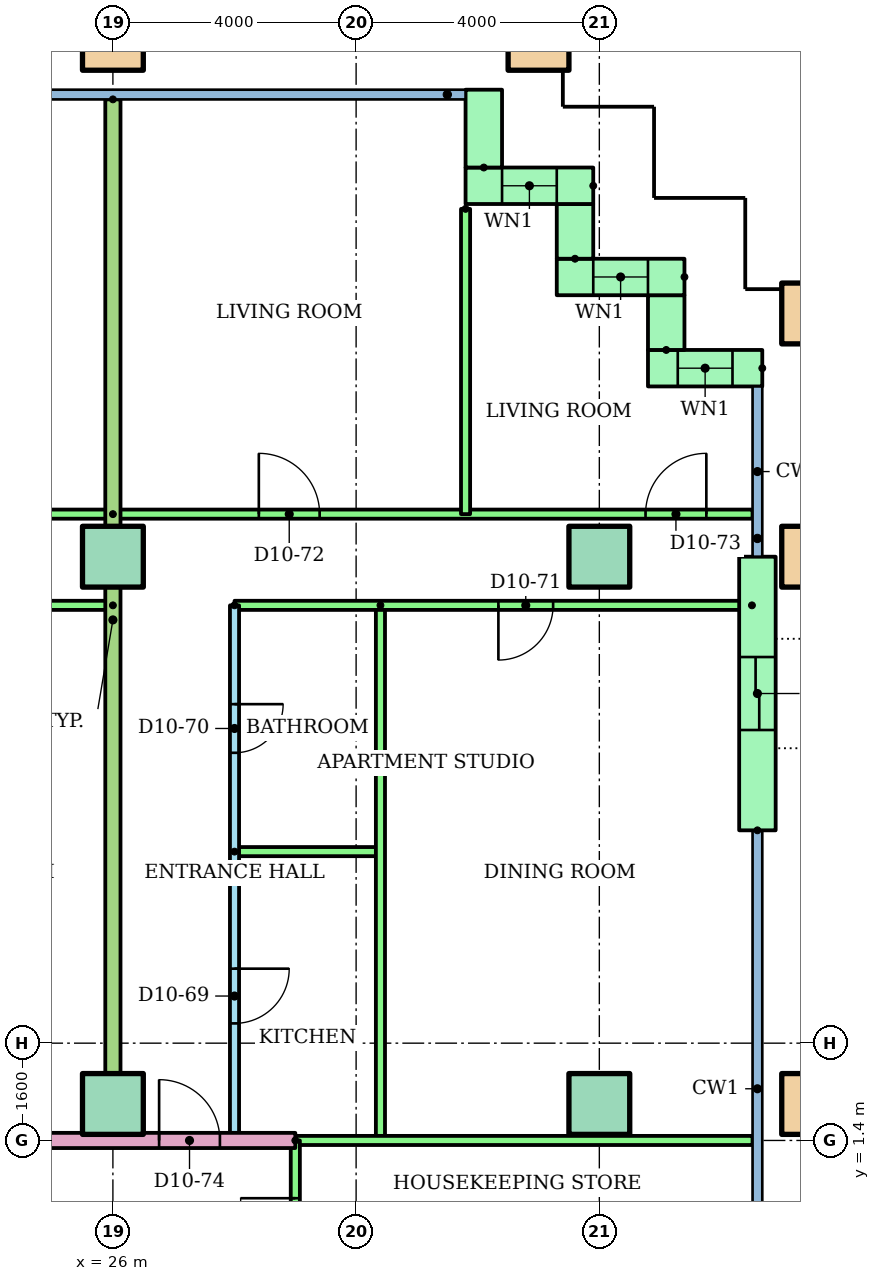
"""IFC4 building model, lengths in metres.
Left out: names, types, materials, properties, quantities, classifications, styles, units other than length and angle.
Written with IfcOpenShell. Run it as: python <this file> out.ifc"""

import sys

from ifc_helpers import new_model, si_unit, direction, frame, frame_2d, origin, origin_2d, place, context, subcontext, project, spatial, rectangle, hollow_rectangle, extrude, element, fill, save


model = new_model("IFC4")
c1 = context("Model", 3, precision=1e-05, world=origin(), true_north=direction((0.0, 1.0)))
c2 = subcontext(c1, "Body", "Model", "MODEL_VIEW")
j1 = project(units=[si_unit("LENGTHUNIT", "METRE"), si_unit("PLANEANGLEUNIT", "RADIAN")], contexts=[c1])
p1 = place(None, origin())
s1 = spatial("IfcSite", under=j1, at=p1, CompositionType="ELEMENT")
p2 = place(p1, origin())
s2 = spatial("IfcBuilding", under=s1, at=p2, CompositionType="ELEMENT")
p3 = place(p2, frame((0.0, 0.0, 41.6)))
s3 = spatial("IfcBuildingStorey", under=s2, at=p3, CompositionType="ELEMENT", Elevation=41.6)
for number, where in (
    (1, (26.0, 2.0, 0.0)),
    (2, (34.0, 2.0, 0.0)),
):
    element("IfcColumn", number, at=place(p3, frame(where)), inside=s3, PredefinedType="COLUMN", context=c2, shape_type="SweptSolid", body=[
        extrude(rectangle(XDim=1.0, YDim=1.0, at=origin_2d()), origin(), (0.0, 0.0, 1.0), 3.2),
    ])
p4 = place(p3, frame((37.5, 2.0, 0.0)))
e3 = element("IfcColumn", 3, at=p4, inside=s3, PredefinedType="COLUMN", context=c2, shape_type="SweptSolid", body=[
    extrude(hollow_rectangle(XDim=1.0, YDim=1.0, WallThickness=0.05, at=origin_2d()), origin(), (0.0, 0.0, 1.0), 3.2),
])
for number, where in (
    (4, (26.0, 11.0, 0.0)),
    (5, (34.0, 11.0, 0.0)),
):
    element("IfcColumn", number, at=place(p3, frame(where)), inside=s3, PredefinedType="COLUMN", context=c2, shape_type="SweptSolid", body=[
        extrude(rectangle(XDim=1.0, YDim=1.0, at=origin_2d()), origin(), (0.0, 0.0, 1.0), 3.2),
    ])
for number, where in (
    (6, (37.5, 11.0, 0.0)),
    (7, (37.5, 15.0, 0.0)),
    (8, (26.0, 19.5, 0.0)),
    (9, (33.0, 19.5, 0.0)),
):
    element("IfcColumn", number, at=place(p3, frame(where)), inside=s3, PredefinedType="COLUMN", context=c2, shape_type="SweptSolid", body=[
        extrude(hollow_rectangle(XDim=1.0, YDim=1.0, WallThickness=0.05, at=origin_2d()), origin(), (0.0, 0.0, 1.0), 3.2),
    ])
p5 = place(p3, frame((36.68, 14.1, 0.0), z_axis=(0.0, 0.0, 1.0), x_axis=(-1.0, 0.0, 0.0)))
e10 = element("IfcWall", 10, at=p5, inside=s3, PredefinedType="STANDARD", context=c2, shape_type="SweptSolid", body=[
    extrude(rectangle(XDim=1.88, YDim=0.6, at=frame_2d((0.94, 0.0))), origin(), (0.0, 0.0, 1.0), 2.92),
])
p6 = place(p5, frame((0.49, 0.0, 0.9)))
e11 = element("IfcOpeningElement", 11, at=p6, cuts=e10, PredefinedType="OPENING", context=c2, shape_type="SweptSolid", body=[
    extrude(rectangle(XDim=0.9, YDim=1.5, at=frame_2d((0.45, 0.75))), frame((0.0, 0.31, 0.0), z_axis=(0.0, -1.0, 0.0), x_axis=(1.0, 0.0, 0.0)), (0.0, 0.0, 1.0), 0.62),
])
p7 = place(p3, frame((35.1, 14.4, 0.0), z_axis=(0.0, 0.0, 1.0), x_axis=(0.0, 1.0, 0.0)))
e12 = element("IfcWall", 12, at=p7, inside=s3, PredefinedType="STANDARD", context=c2, shape_type="SweptSolid", body=[
    extrude(rectangle(XDim=0.9, YDim=0.6, at=frame_2d((0.45, 0.0))), origin(), (0.0, 0.0, 1.0), 2.92),
])
p8 = place(p3, frame((35.4, 15.6, 0.0), z_axis=(0.0, 0.0, 1.0), x_axis=(-1.0, 0.0, 0.0)))
e13 = element("IfcWall", 13, at=p8, inside=s3, PredefinedType="STANDARD", context=c2, shape_type="SweptSolid", body=[
    extrude(rectangle(XDim=2.1, YDim=0.6, at=frame_2d((1.05, 0.0))), origin(), (0.0, 0.0, 1.0), 2.92),
])
p9 = place(p8, frame((0.6, 0.0, 0.9)))
e14 = element("IfcOpeningElement", 14, at=p9, cuts=e13, PredefinedType="OPENING", context=c2, shape_type="SweptSolid", body=[
    extrude(rectangle(XDim=0.9, YDim=1.5, at=frame_2d((0.45, 0.75))), frame((0.0, 0.31, 0.0), z_axis=(0.0, -1.0, 0.0), x_axis=(1.0, 0.0, 0.0)), (0.0, 0.0, 1.0), 0.62),
])
p10 = place(p3, frame((33.6, 15.9, 0.0), z_axis=(0.0, 0.0, 1.0), x_axis=(0.0, 1.0, 0.0)))
e15 = element("IfcWall", 15, at=p10, inside=s3, PredefinedType="STANDARD", context=c2, shape_type="SweptSolid", body=[
    extrude(rectangle(XDim=0.9, YDim=0.6, at=frame_2d((0.45, 0.0))), origin(), (0.0, 0.0, 1.0), 2.92),
])
p11 = place(p3, frame((33.9, 17.1, 0.0), z_axis=(0.0, 0.0, 1.0), x_axis=(-1.0, 0.0, 0.0)))
e16 = element("IfcWall", 16, at=p11, inside=s3, PredefinedType="STANDARD", context=c2, shape_type="SweptSolid", body=[
    extrude(rectangle(XDim=2.1, YDim=0.6, at=frame_2d((1.05, 0.0))), origin(), (0.0, 0.0, 1.0), 2.92),
])
p12 = place(p11, frame((0.6, 0.0, 0.9)))
e17 = element("IfcOpeningElement", 17, at=p12, cuts=e16, PredefinedType="OPENING", context=c2, shape_type="SweptSolid", body=[
    extrude(rectangle(XDim=0.9, YDim=1.5, at=frame_2d((0.45, 0.75))), frame((0.0, 0.31, 0.0), z_axis=(0.0, -1.0, 0.0), x_axis=(1.0, 0.0, 0.0)), (0.0, 0.0, 1.0), 0.62),
])
p13 = place(p3, frame((32.1, 17.4, 0.0), z_axis=(0.0, 0.0, 1.0), x_axis=(0.0, 1.0, 0.0)))
e18 = element("IfcWall", 18, at=p13, inside=s3, PredefinedType="STANDARD", context=c2, shape_type="SweptSolid", body=[
    extrude(rectangle(XDim=1.28, YDim=0.6, at=frame_2d((0.64, 0.0))), origin(), (0.0, 0.0, 1.0), 2.92),
])
p14 = place(p3, frame((36.6, 6.5, 0.0), z_axis=(0.0, 0.0, 1.0), x_axis=(0.0, 1.0, 0.0)))
e19 = element("IfcWall", 19, at=p14, inside=s3, PredefinedType="STANDARD", context=c2, shape_type="SweptSolid", body=[
    extrude(rectangle(XDim=4.5, YDim=0.6, at=frame_2d((2.25, 0.0))), origin(), (0.0, 0.0, 1.0), 2.92),
])
p15 = place(p14, frame((1.65, 0.0, 0.0)))
e20 = element("IfcOpeningElement", 20, at=p15, cuts=e19, PredefinedType="OPENING", context=c2, shape_type="SweptSolid", body=[
    extrude(rectangle(XDim=1.2, YDim=2.1, at=frame_2d((0.6, 1.05))), frame((0.0, 0.31, 0.0), z_axis=(0.0, -1.0, 0.0), x_axis=(1.0, 0.0, 0.0)), (0.0, 0.0, 1.0), 0.62),
])
p16 = place(p3, frame((26.0, 10.2, 0.0), z_axis=(0.0, 0.0, 1.0), x_axis=(-1.0, 0.0, 0.0)))
e21 = element("IfcWall", 21, at=p16, inside=s3, PredefinedType="PARTITIONING", context=c2, shape_type="SweptSolid", body=[
    extrude(rectangle(XDim=10.0, YDim=0.15, at=frame_2d((5.0, 0.0))), origin(), (0.0, 0.0, 1.0), 2.4),
])
p17 = place(p16, frame((5.525, 0.0, 0.0)))
e22 = element("IfcOpeningElement", 22, at=p17, cuts=e21, PredefinedType="OPENING", context=c2, shape_type="SweptSolid", body=[
    extrude(rectangle(XDim=0.9, YDim=2.1, at=frame_2d((0.45, 1.05))), frame((0.0, 0.085, 0.0), z_axis=(0.0, -1.0, 0.0), x_axis=(1.0, 0.0, 0.0)), (0.0, 0.0, 1.0), 0.17),
])
p18 = place(p16, frame((1.725, 0.0, 0.0)))
e23 = element("IfcOpeningElement", 23, at=p18, cuts=e21, PredefinedType="OPENING", context=c2, shape_type="SweptSolid", body=[
    extrude(rectangle(XDim=0.9, YDim=2.1, at=frame_2d((0.45, 1.05))), frame((0.0, 0.085, 0.0), z_axis=(0.0, -1.0, 0.0), x_axis=(1.0, 0.0, 0.0)), (0.0, 0.0, 1.0), 0.17),
])
p19 = place(p3, frame((14.0, 11.7, 0.0)))
e24 = element("IfcWall", 24, at=p19, inside=s3, PredefinedType="PARTITIONING", context=c2, shape_type="SweptSolid", body=[
    extrude(rectangle(XDim=12.0, YDim=0.15, at=frame_2d((6.0, 0.0))), origin(), (0.0, 0.0, 1.0), 2.4),
])
p20 = place(p19, frame((1.5, 0.0, 0.0)))
e25 = element("IfcOpeningElement", 25, at=p20, cuts=e24, PredefinedType="OPENING", context=c2, shape_type="SweptSolid", body=[
    extrude(rectangle(XDim=1.0, YDim=2.1, at=frame_2d((0.5, 1.05))), frame((0.0, 0.085, 0.0), z_axis=(0.0, -1.0, 0.0), x_axis=(1.0, 0.0, 0.0)), (0.0, 0.0, 1.0), 0.17),
])
p21 = place(p19, frame((7.5, 0.0, 0.0)))
e26 = element("IfcOpeningElement", 26, at=p21, cuts=e24, PredefinedType="OPENING", context=c2, shape_type="SweptSolid", body=[
    extrude(rectangle(XDim=1.0, YDim=2.1, at=frame_2d((0.5, 1.05))), frame((0.0, 0.085, 0.0), z_axis=(0.0, -1.0, 0.0), x_axis=(1.0, 0.0, 0.0)), (0.0, 0.0, 1.0), 0.17),
])
p22 = place(p3, frame((28.0, 10.2, 0.0), z_axis=(0.0, 0.0, 1.0), x_axis=(0.0, -1.0, 0.0)))
e27 = element("IfcWall", 27, at=p22, inside=s3, PredefinedType="PARTITIONING", context=c2, shape_type="SweptSolid", body=[
    extrude(rectangle(XDim=8.8, YDim=0.15, at=frame_2d((4.4, 0.0))), origin(), (0.0, 0.0, 1.0), 2.4),
])
p23 = place(p22, frame((5.975, 0.0, 0.0)))
e28 = element("IfcOpeningElement", 28, at=p23, cuts=e27, PredefinedType="OPENING", context=c2, shape_type="SweptSolid", body=[
    extrude(rectangle(XDim=0.9, YDim=2.1, at=frame_2d((0.45, 1.05))), frame((0.0, 0.085, 0.0), z_axis=(0.0, -1.0, 0.0), x_axis=(1.0, 0.0, 0.0)), (0.0, 0.0, 1.0), 0.17),
])
p24 = place(p22, frame((1.625, 0.0, 0.0)))
e29 = element("IfcOpeningElement", 29, at=p24, cuts=e27, PredefinedType="OPENING", context=c2, shape_type="SweptSolid", body=[
    extrude(rectangle(XDim=0.8, YDim=2.1, at=frame_2d((0.4, 1.05))), frame((0.0, 0.085, 0.0), z_axis=(0.0, -1.0, 0.0), x_axis=(1.0, 0.0, 0.0)), (0.0, 0.0, 1.0), 0.17),
])
p25 = place(p3, frame((28.0, 6.15, 0.0)))
e30 = element("IfcWall", 30, at=p25, inside=s3, PredefinedType="PARTITIONING", context=c2, shape_type="SweptSolid", body=[
    extrude(rectangle(XDim=2.4, YDim=0.15, at=frame_2d((1.2, 0.0))), origin(), (0.0, 0.0, 1.0), 2.4),
])
p26 = place(p3, frame((30.4, 10.2, 0.0), z_axis=(0.0, 0.0, 1.0), x_axis=(0.0, -1.0, 0.0)))
e31 = element("IfcWall", 31, at=p26, inside=s3, PredefinedType="PARTITIONING", context=c2, shape_type="SweptSolid", body=[
    extrude(rectangle(XDim=8.8, YDim=0.15, at=frame_2d((4.4, 0.0))), origin(), (0.0, 0.0, 1.0), 2.4),
])
p27 = place(p3, frame((36.51, 10.2, 0.0), z_axis=(0.0, 0.0, 1.0), x_axis=(-1.0, 0.0, 0.0)))
e32 = element("IfcWall", 32, at=p27, inside=s3, PredefinedType="PARTITIONING", context=c2, shape_type="SweptSolid", body=[
    extrude(rectangle(XDim=8.51, YDim=0.15, at=frame_2d((4.255, 0.0))), origin(), (0.0, 0.0, 1.0), 2.4),
])
p28 = place(p27, frame((3.27, 0.0, 0.0)))
e33 = element("IfcOpeningElement", 33, at=p28, cuts=e32, PredefinedType="OPENING", context=c2, shape_type="SweptSolid", body=[
    extrude(rectangle(XDim=0.9, YDim=2.1, at=frame_2d((0.45, 1.05))), frame((0.0, 0.085, 0.0), z_axis=(0.0, -1.0, 0.0), x_axis=(1.0, 0.0, 0.0)), (0.0, 0.0, 1.0), 0.17),
])
p29 = place(p3, frame((26.0, 11.7, 0.0)))
e34 = element("IfcWall", 34, at=p29, inside=s3, PredefinedType="PARTITIONING", context=c2, shape_type="SweptSolid", body=[
    extrude(rectangle(XDim=10.52, YDim=0.15, at=frame_2d((5.26, 0.0))), origin(), (0.0, 0.0, 1.0), 2.4),
])
p30 = place(p29, frame((2.4, 0.0, 0.0)))
e35 = element("IfcOpeningElement", 35, at=p30, cuts=e34, PredefinedType="OPENING", context=c2, shape_type="SweptSolid", body=[
    extrude(rectangle(XDim=1.0, YDim=2.1, at=frame_2d((0.5, 1.05))), frame((0.0, 0.085, 0.0), z_axis=(0.0, -1.0, 0.0), x_axis=(1.0, 0.0, 0.0)), (0.0, 0.0, 1.0), 0.17),
])
p31 = place(p29, frame((8.76, 0.0, 0.0)))
e36 = element("IfcOpeningElement", 36, at=p31, cuts=e34, PredefinedType="OPENING", context=c2, shape_type="SweptSolid", body=[
    extrude(rectangle(XDim=1.0, YDim=2.1, at=frame_2d((0.5, 1.05))), frame((0.0, 0.085, 0.0), z_axis=(0.0, -1.0, 0.0), x_axis=(1.0, 0.0, 0.0)), (0.0, 0.0, 1.0), 0.17),
])
p32 = place(p3, frame((31.8, 16.72, 0.0), z_axis=(0.0, 0.0, 1.0), x_axis=(0.0, -1.0, 0.0)))
e37 = element("IfcWall", 37, at=p32, inside=s3, PredefinedType="PARTITIONING", context=c2, shape_type="SweptSolid", body=[
    extrude(rectangle(XDim=5.02, YDim=0.15, at=frame_2d((2.51, 0.0))), origin(), (0.0, 0.0, 1.0), 2.4),
])
p33 = place(p3, frame((26.0, 18.521, 0.0), z_axis=(0.0, 0.0, 1.0), x_axis=(0.0, -1.0, 0.0)))
e38 = element("IfcWall", 38, at=p33, inside=s3, PredefinedType="PARTITIONING", context=c2, shape_type="SweptSolid", body=[
    extrude(rectangle(XDim=17.121, YDim=0.25, at=frame_2d((8.561, 0.0))), origin(), (0.0, 0.0, 1.0), 2.4),
])
p34 = place(p3, frame((14.0, 1.4, 0.0)))
e39 = element("IfcWall", 39, at=p34, inside=s3, PredefinedType="PARTITIONING", context=c2, shape_type="SweptSolid", body=[
    extrude(rectangle(XDim=15.0, YDim=0.25, at=frame_2d((7.5, 0.0))), origin(), (0.0, 0.0, 1.0), 2.4),
])
p35 = place(p34, frame((0.5, 0.0, 0.0)))
e40 = element("IfcOpeningElement", 40, at=p35, cuts=e39, PredefinedType="OPENING", context=c2, shape_type="SweptSolid", body=[
    extrude(rectangle(XDim=1.0, YDim=2.1, at=frame_2d((0.5, 1.05))), frame((0.0, 0.135, 0.0), z_axis=(0.0, -1.0, 0.0), x_axis=(1.0, 0.0, 0.0)), (0.0, 0.0, 1.0), 0.27),
])
p36 = place(p34, frame((12.76, 0.0, 0.0)))
e41 = element("IfcOpeningElement", 41, at=p36, cuts=e39, PredefinedType="OPENING", context=c2, shape_type="SweptSolid", body=[
    extrude(rectangle(XDim=1.0, YDim=2.1, at=frame_2d((0.5, 1.05))), frame((0.0, 0.135, 0.0), z_axis=(0.0, -1.0, 0.0), x_axis=(1.0, 0.0, 0.0)), (0.0, 0.0, 1.0), 0.27),
])
p37 = place(p3, frame((29.0, 1.4, 0.0)))
e42 = element("IfcWall", 42, at=p37, inside=s3, PredefinedType="PARTITIONING", context=c2, shape_type="SweptSolid", body=[
    extrude(rectangle(XDim=7.52, YDim=0.15, at=frame_2d((3.76, 0.0))), origin(), (0.0, 0.0, 1.0), 2.4),
])
p38 = place(p3, frame((29.0, -1.4, 0.0), z_axis=(0.0, 0.0, 1.0), x_axis=(0.0, 1.0, 0.0)))
e43 = element("IfcWall", 43, at=p38, inside=s3, PredefinedType="PARTITIONING", context=c2, shape_type="SweptSolid", body=[
    extrude(rectangle(XDim=2.8, YDim=0.15, at=frame_2d((1.4, 0.0))), origin(), (0.0, 0.0, 1.0), 2.4),
])
p39 = place(p38, frame((0.95, 0.0, 0.0)))
e44 = element("IfcOpeningElement", 44, at=p39, cuts=e43, PredefinedType="OPENING", context=c2, shape_type="SweptSolid", body=[
    extrude(rectangle(XDim=0.9, YDim=2.1, at=frame_2d((0.45, 1.05))), frame((0.0, 0.085, 0.0), z_axis=(0.0, -1.0, 0.0), x_axis=(1.0, 0.0, 0.0)), (0.0, 0.0, 1.0), 0.17),
])
p40 = place(p6, origin())
e45 = element("IfcWindow", 45, at=p40, inside=s3, PartitioningType="SINGLE_PANEL", PredefinedType="WINDOW", context=c2, shape_type="SweptSolid", body=[
    extrude(rectangle(XDim=0.9, YDim=1.5, at=frame_2d((0.45, 0.75))), frame((0.0, 0.03, 0.0), z_axis=(0.0, -1.0, 0.0), x_axis=(1.0, 0.0, 0.0)), (0.0, 0.0, 1.0), 0.06),
])
fill(e11, e45)
p41 = place(p9, origin())
e46 = element("IfcWindow", 46, at=p41, inside=s3, PartitioningType="SINGLE_PANEL", PredefinedType="WINDOW", context=c2, shape_type="SweptSolid", body=[
    extrude(rectangle(XDim=0.9, YDim=1.5, at=frame_2d((0.45, 0.75))), frame((0.0, 0.03, 0.0), z_axis=(0.0, -1.0, 0.0), x_axis=(1.0, 0.0, 0.0)), (0.0, 0.0, 1.0), 0.06),
])
fill(e14, e46)
p42 = place(p12, origin())
e47 = element("IfcWindow", 47, at=p42, inside=s3, PartitioningType="SINGLE_PANEL", PredefinedType="WINDOW", context=c2, shape_type="SweptSolid", body=[
    extrude(rectangle(XDim=0.9, YDim=1.5, at=frame_2d((0.45, 0.75))), frame((0.0, 0.03, 0.0), z_axis=(0.0, -1.0, 0.0), x_axis=(1.0, 0.0, 0.0)), (0.0, 0.0, 1.0), 0.06),
])
fill(e17, e47)
p43 = place(p23, origin())
e48 = element("IfcDoor", 48, at=p43, inside=s3, OperationType="SINGLE_SWING_LEFT", PredefinedType="DOOR", context=c2, shape_type="SweptSolid", body=[
    extrude(rectangle(XDim=0.9, YDim=2.1, at=frame_2d((0.45, 1.05))), frame((0.0, 0.025, 0.0), z_axis=(0.0, -1.0, 0.0), x_axis=(1.0, 0.0, 0.0)), (0.0, 0.0, 1.0), 0.05),
])
fill(e28, e48)
p44 = place(p24, origin())
e49 = element("IfcDoor", 49, at=p44, inside=s3, OperationType="SINGLE_SWING_LEFT", PredefinedType="DOOR", context=c2, shape_type="SweptSolid", body=[
    extrude(rectangle(XDim=0.8, YDim=2.1, at=frame_2d((0.4, 1.05))), frame((0.0, 0.025, 0.0), z_axis=(0.0, -1.0, 0.0), x_axis=(1.0, 0.0, 0.0)), (0.0, 0.0, 1.0), 0.05),
])
fill(e29, e49)
p45 = place(p28, origin())
e50 = element("IfcDoor", 50, at=p45, inside=s3, OperationType="SINGLE_SWING_RIGHT", PredefinedType="DOOR", context=c2, shape_type="SweptSolid", body=[
    extrude(rectangle(XDim=0.9, YDim=2.1, at=frame_2d((0.45, 1.05))), frame((0.0, 0.025, 0.0), z_axis=(0.0, -1.0, 0.0), x_axis=(1.0, 0.0, 0.0)), (0.0, 0.0, 1.0), 0.05),
])
fill(e33, e50)
p46 = place(p30, origin())
e51 = element("IfcDoor", 51, at=p46, inside=s3, OperationType="SINGLE_SWING_LEFT", PredefinedType="DOOR", context=c2, shape_type="SweptSolid", body=[
    extrude(rectangle(XDim=1.0, YDim=2.1, at=frame_2d((0.5, 1.05))), frame((0.0, 0.025, 0.0), z_axis=(0.0, -1.0, 0.0), x_axis=(1.0, 0.0, 0.0)), (0.0, 0.0, 1.0), 0.05),
])
fill(e35, e51)
p47 = place(p31, origin())
e52 = element("IfcDoor", 52, at=p47, inside=s3, OperationType="SINGLE_SWING_RIGHT", PredefinedType="DOOR", context=c2, shape_type="SweptSolid", body=[
    extrude(rectangle(XDim=1.0, YDim=2.1, at=frame_2d((0.5, 1.05))), frame((0.0, 0.025, 0.0), z_axis=(0.0, -1.0, 0.0), x_axis=(1.0, 0.0, 0.0)), (0.0, 0.0, 1.0), 0.05),
])
fill(e36, e52)
p48 = place(p36, origin())
e53 = element("IfcDoor", 53, at=p48, inside=s3, OperationType="SINGLE_SWING_LEFT", PredefinedType="DOOR", context=c2, shape_type="SweptSolid", body=[
    extrude(rectangle(XDim=1.0, YDim=2.1, at=frame_2d((0.5, 1.05))), frame((0.0, 0.025, 0.0), z_axis=(0.0, -1.0, 0.0), x_axis=(1.0, 0.0, 0.0)), (0.0, 0.0, 1.0), 0.05),
])
fill(e41, e53)
p49 = place(p39, origin())
e54 = element("IfcDoor", 54, at=p49, inside=s3, OperationType="SINGLE_SWING_RIGHT", PredefinedType="DOOR", context=c2, shape_type="SweptSolid", body=[
    extrude(rectangle(XDim=0.9, YDim=2.1, at=frame_2d((0.45, 1.05))), frame((0.0, 0.025, 0.0), z_axis=(0.0, -1.0, 0.0), x_axis=(1.0, 0.0, 0.0)), (0.0, 0.0, 1.0), 0.05),
])
fill(e44, e54)
p50 = place(p15, origin())
e55 = element("IfcDoor", 55, at=p50, inside=s3, OperationType="SLIDING_TO_LEFT", PredefinedType="DOOR", context=c2, shape_type="SweptSolid", body=[
    extrude(rectangle(XDim=1.2, YDim=2.1, at=frame_2d((0.6, 1.05))), frame((0.0, 0.025, 0.0), z_axis=(0.0, -1.0, 0.0), x_axis=(1.0, 0.0, 0.0)), (0.0, 0.0, 1.0), 0.05),
])
fill(e20, e55)
save(model, sys.argv[1])
